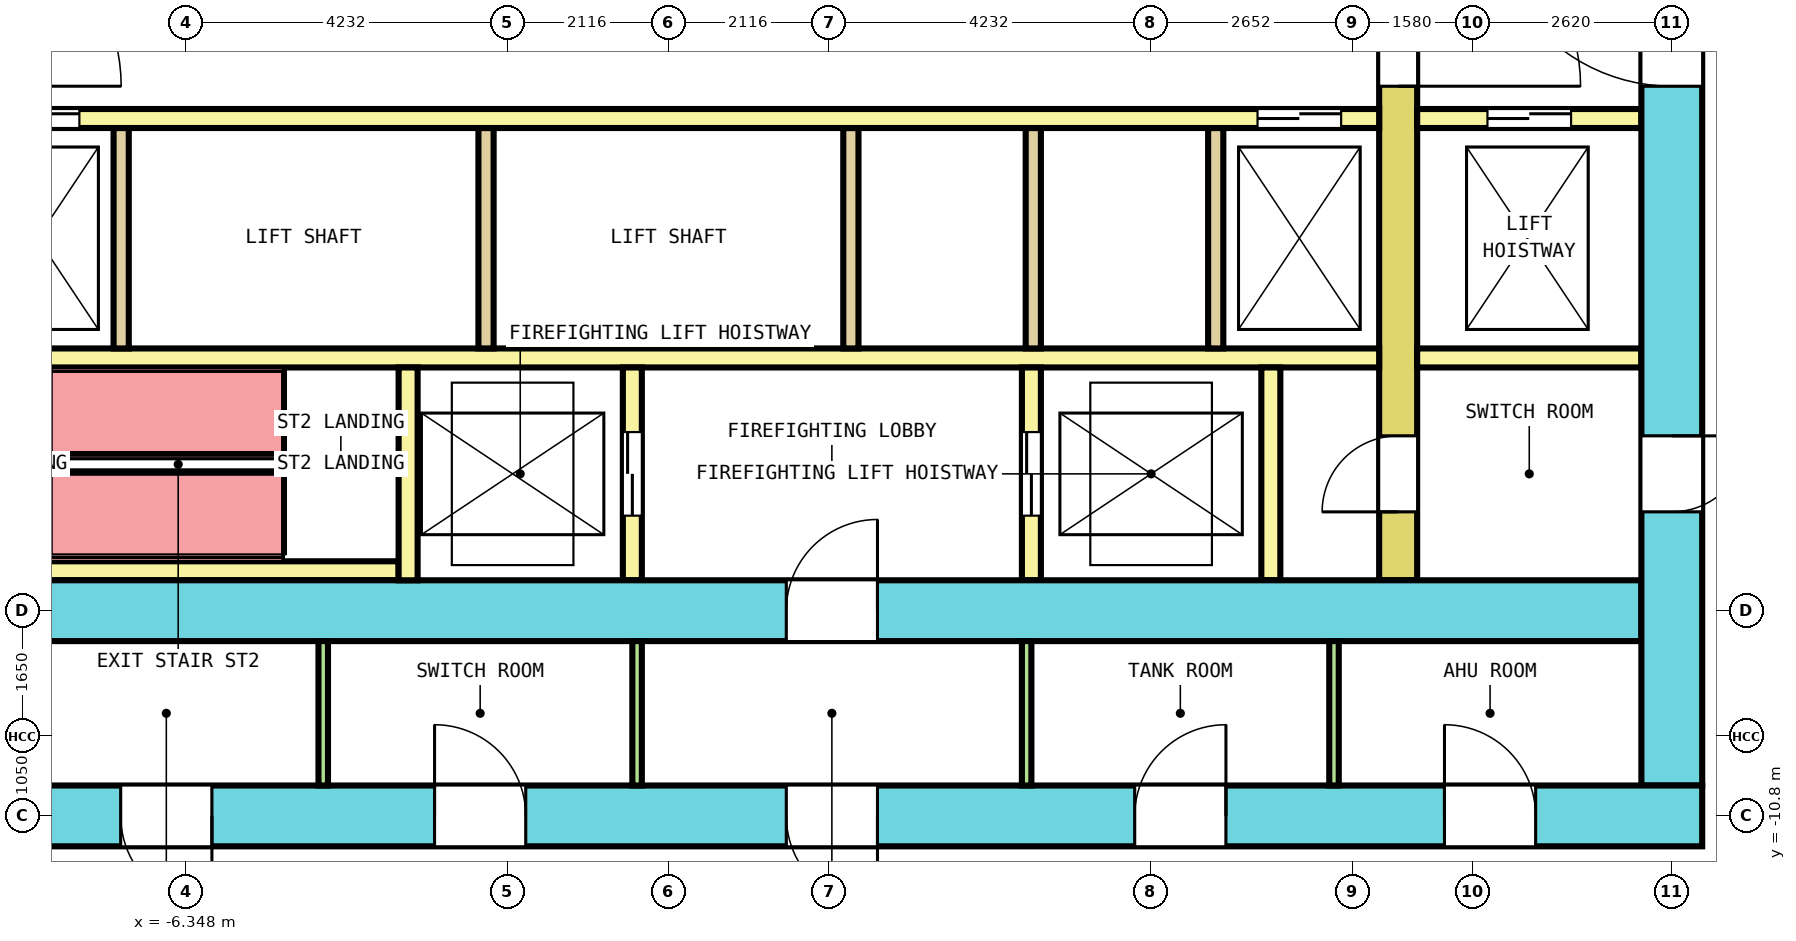
"""IFC4 building model, lengths in metres.
Left out: names, types, materials, properties, quantities, classifications, styles, units other than length and angle.
Written with IfcOpenShell. Run it as: python <this file> out.ifc"""

import sys

from ifc_helpers import new_model, si_unit, direction, frame, frame_2d, origin, place, context, subcontext, project, spatial, rectangle, extrude, element, fill, save


model = new_model("IFC4")
c1 = context("Model", 3, precision=1e-05, world=origin(), true_north=direction((0.0, 1.0)))
c2 = subcontext(c1, "Body", "Model", "MODEL_VIEW")
j1 = project(units=[si_unit("LENGTHUNIT", "METRE"), si_unit("PLANEANGLEUNIT", "RADIAN")], contexts=[c1])
p1 = place(None, origin())
s1 = spatial("IfcSite", under=j1, at=p1, CompositionType="ELEMENT")
p2 = place(p1, origin())
s2 = spatial("IfcBuilding", under=s1, at=p2, CompositionType="ELEMENT")
p3 = place(p2, frame((0.0, 0.0, 71.8)))
s3 = spatial("IfcBuildingStorey", under=s2, at=p3, CompositionType="ELEMENT", Elevation=71.8)
p4 = place(p3, frame((-13.6, -10.8, 0.0), z_axis=(0.0, 0.0, 1.0), x_axis=(1.0, 0.0, 0.0)))
e1 = element("IfcWall", 1, at=p4, inside=s3, PredefinedType="SHEAR", context=c2, shape_type="SweptSolid", body=[
    extrude(rectangle(XDim=27.2, YDim=0.8, at=frame_2d((13.6, 0.0))), origin(), (0.0, 0.0, 1.0), 8.7),
])
p5 = place(p4, frame((2.233, 0.0, 0.0)))
e2 = element("IfcOpeningElement", 2, at=p5, cuts=e1, PredefinedType="OPENING", context=c2, shape_type="SweptSolid", body=[
    extrude(rectangle(XDim=1.2, YDim=2.1, at=frame_2d((0.6, 1.05))), frame((0.0, 0.41, 0.0), z_axis=(0.0, -1.0, 0.0), x_axis=(1.0, 0.0, 0.0)), (0.0, 0.0, 1.0), 0.82),
])
p6 = place(p4, frame((6.394, 0.0, 0.0)))
e3 = element("IfcOpeningElement", 3, at=p6, cuts=e1, PredefinedType="OPENING", context=c2, shape_type="SweptSolid", body=[
    extrude(rectangle(XDim=1.2, YDim=2.1, at=frame_2d((0.6, 1.05))), frame((0.0, 0.41, 0.0), z_axis=(0.0, -1.0, 0.0), x_axis=(1.0, 0.0, 0.0)), (0.0, 0.0, 1.0), 0.82),
])
p7 = place(p4, frame((10.523, 0.0, 0.0)))
e4 = element("IfcOpeningElement", 4, at=p7, cuts=e1, PredefinedType="OPENING", context=c2, shape_type="SweptSolid", body=[
    extrude(rectangle(XDim=1.2, YDim=2.1, at=frame_2d((0.6, 1.05))), frame((0.0, 0.41, 0.0), z_axis=(0.0, -1.0, 0.0), x_axis=(1.0, 0.0, 0.0)), (0.0, 0.0, 1.0), 0.82),
])
p8 = place(p4, frame((19.734, 0.0, 0.0)))
e5 = element("IfcOpeningElement", 5, at=p8, cuts=e1, PredefinedType="OPENING", context=c2, shape_type="SweptSolid", body=[
    extrude(rectangle(XDim=1.2, YDim=2.1, at=frame_2d((0.6, 1.05))), frame((0.0, 0.41, 0.0), z_axis=(0.0, -1.0, 0.0), x_axis=(1.0, 0.0, 0.0)), (0.0, 0.0, 1.0), 0.82),
])
p9 = place(p4, frame((23.809, 0.0, 0.0)))
e6 = element("IfcOpeningElement", 6, at=p9, cuts=e1, PredefinedType="OPENING", context=c2, shape_type="SweptSolid", body=[
    extrude(rectangle(XDim=1.2, YDim=2.1, at=frame_2d((0.6, 1.05))), frame((0.0, 0.41, 0.0), z_axis=(0.0, -1.0, 0.0), x_axis=(1.0, 0.0, 0.0)), (0.0, 0.0, 1.0), 0.82),
])
p10 = place(p4, frame((15.15, 0.0, 0.0)))
e7 = element("IfcOpeningElement", 7, at=p10, cuts=e1, PredefinedType="OPENING", context=c2, shape_type="SweptSolid", body=[
    extrude(rectangle(XDim=1.2, YDim=2.1, at=frame_2d((0.6, 1.05))), frame((0.0, 0.41, 0.0), z_axis=(0.0, -1.0, 0.0), x_axis=(1.0, 0.0, 0.0)), (0.0, 0.0, 1.0), 0.82),
])
p11 = place(p3, frame((13.2, -10.4, 0.0), z_axis=(0.0, 0.0, 1.0), x_axis=(0.0, 1.0, 0.0)))
e8 = element("IfcWall", 8, at=p11, inside=s3, PredefinedType="SHEAR", context=c2, shape_type="SweptSolid", body=[
    extrude(rectangle(XDim=20.8, YDim=0.8, at=frame_2d((10.4, 0.0))), origin(), (0.0, 0.0, 1.0), 8.7),
])
p12 = place(p11, frame((9.2, 0.0, 0.0)))
e9 = element("IfcOpeningElement", 9, at=p12, cuts=e8, PredefinedType="OPENING", context=c2, shape_type="SweptSolid", body=[
    extrude(rectangle(XDim=2.4, YDim=2.1, at=frame_2d((1.2, 1.05))), frame((0.0, 0.41, 0.0), z_axis=(0.0, -1.0, 0.0), x_axis=(1.0, 0.0, 0.0)), (0.0, 0.0, 1.0), 0.82),
])
p13 = place(p11, frame((16.1, 0.0, 0.0)))
e10 = element("IfcOpeningElement", 10, at=p13, cuts=e8, PredefinedType="OPENING", context=c2, shape_type="SweptSolid", body=[
    extrude(rectangle(XDim=1.2, YDim=2.1, at=frame_2d((0.6, 1.05))), frame((0.0, 0.41, 0.0), z_axis=(0.0, -1.0, 0.0), x_axis=(1.0, 0.0, 0.0)), (0.0, 0.0, 1.0), 0.82),
])
p14 = place(p11, frame((3.6, 0.0, 0.0)))
e11 = element("IfcOpeningElement", 11, at=p14, cuts=e8, PredefinedType="OPENING", context=c2, shape_type="SweptSolid", body=[
    extrude(rectangle(XDim=1.0, YDim=2.1, at=frame_2d((0.5, 1.05))), frame((0.0, 0.41, 0.0), z_axis=(0.0, -1.0, 0.0), x_axis=(1.0, 0.0, 0.0)), (0.0, 0.0, 1.0), 0.82),
])
p15 = place(p3, frame((-12.8, -8.1, 0.0), z_axis=(0.0, 0.0, 1.0), x_axis=(1.0, 0.0, 0.0)))
e12 = element("IfcWall", 12, at=p15, inside=s3, PredefinedType="SHEAR", context=c2, shape_type="SweptSolid", body=[
    extrude(rectangle(XDim=25.6, YDim=0.8, at=frame_2d((12.8, 0.0))), origin(), (0.0, 0.0, 1.0), 8.7),
])
p16 = place(p15, frame((14.35, 0.0, 0.0)))
e13 = element("IfcOpeningElement", 13, at=p16, cuts=e12, PredefinedType="OPENING", context=c2, shape_type="SweptSolid", body=[
    extrude(rectangle(XDim=1.2, YDim=2.1, at=frame_2d((0.6, 1.05))), frame((0.0, 0.41, 0.0), z_axis=(0.0, -1.0, 0.0), x_axis=(1.0, 0.0, 0.0)), (0.0, 0.0, 1.0), 0.82),
])
p17 = place(p3, frame((9.6, -7.7, 0.0), z_axis=(0.0, 0.0, 1.0), x_axis=(0.0, 1.0, 0.0)))
e14 = element("IfcWall", 14, at=p17, inside=s3, PredefinedType="SHEAR", context=c2, shape_type="SweptSolid", body=[
    extrude(rectangle(XDim=15.4, YDim=0.5, at=frame_2d((7.7, 0.0))), origin(), (0.0, 0.0, 1.0), 8.7),
])
p18 = place(p17, frame((6.5, 0.0, 0.0)))
e15 = element("IfcOpeningElement", 15, at=p18, cuts=e14, PredefinedType="OPENING", context=c2, shape_type="SweptSolid", body=[
    extrude(rectangle(XDim=2.4, YDim=2.1, at=frame_2d((1.2, 1.05))), frame((0.0, 0.26, 0.0), z_axis=(0.0, -1.0, 0.0), x_axis=(1.0, 0.0, 0.0)), (0.0, 0.0, 1.0), 0.52),
])
p19 = place(p17, frame((13.4, 0.0, 0.0)))
e16 = element("IfcOpeningElement", 16, at=p19, cuts=e14, PredefinedType="OPENING", context=c2, shape_type="SweptSolid", body=[
    extrude(rectangle(XDim=1.2, YDim=2.1, at=frame_2d((0.6, 1.05))), frame((0.0, 0.26, 0.0), z_axis=(0.0, -1.0, 0.0), x_axis=(1.0, 0.0, 0.0)), (0.0, 0.0, 1.0), 0.52),
])
p20 = place(p17, frame((0.9, 0.0, 0.0)))
e17 = element("IfcOpeningElement", 17, at=p20, cuts=e14, PredefinedType="OPENING", context=c2, shape_type="SweptSolid", body=[
    extrude(rectangle(XDim=1.0, YDim=2.1, at=frame_2d((0.5, 1.05))), frame((0.0, 0.26, 0.0), z_axis=(0.0, -1.0, 0.0), x_axis=(1.0, 0.0, 0.0)), (0.0, 0.0, 1.0), 0.52),
])
p21 = place(p3, frame((-9.35, -1.625, 0.0), z_axis=(0.0, 0.0, 1.0), x_axis=(1.0, 0.0, 0.0)))
e18 = element("IfcWall", 18, at=p21, inside=s3, PredefinedType="SOLIDWALL", context=c2, shape_type="SweptSolid", body=[
    extrude(rectangle(XDim=18.7, YDim=0.25, at=frame_2d((9.35, 0.0))), origin(), (0.0, 0.0, 1.0), 8.7),
])
p22 = place(p21, frame((0.5, 0.0, 0.0)))
e19 = element("IfcOpeningElement", 19, at=p22, cuts=e18, PredefinedType="OPENING", context=c2, shape_type="SweptSolid", body=[
    extrude(rectangle(XDim=1.1, YDim=2.1, at=frame_2d((0.55, 1.05))), frame((0.0, 0.135, 0.0), z_axis=(0.0, -1.0, 0.0), x_axis=(1.0, 0.0, 0.0)), (0.0, 0.0, 1.0), 0.27),
])
p23 = place(p21, frame((17.1, 0.0, 0.0)))
e20 = element("IfcOpeningElement", 20, at=p23, cuts=e18, PredefinedType="OPENING", context=c2, shape_type="SweptSolid", body=[
    extrude(rectangle(XDim=1.1, YDim=2.1, at=frame_2d((0.55, 1.05))), frame((0.0, 0.135, 0.0), z_axis=(0.0, -1.0, 0.0), x_axis=(1.0, 0.0, 0.0)), (0.0, 0.0, 1.0), 0.27),
])
p24 = place(p3, frame((9.85, -1.625, 0.0), z_axis=(0.0, 0.0, 1.0), x_axis=(1.0, 0.0, 0.0)))
e21 = element("IfcWall", 21, at=p24, inside=s3, PredefinedType="SOLIDWALL", context=c2, shape_type="SweptSolid", body=[
    extrude(rectangle(XDim=2.95, YDim=0.25, at=frame_2d((1.475, 0.0))), origin(), (0.0, 0.0, 1.0), 8.7),
])
p25 = place(p24, frame((0.925, 0.0, 0.0)))
e22 = element("IfcOpeningElement", 22, at=p25, cuts=e21, PredefinedType="OPENING", context=c2, shape_type="SweptSolid", body=[
    extrude(rectangle(XDim=1.1, YDim=2.1, at=frame_2d((0.55, 1.05))), frame((0.0, 0.135, 0.0), z_axis=(0.0, -1.0, 0.0), x_axis=(1.0, 0.0, 0.0)), (0.0, 0.0, 1.0), 0.27),
])
p26 = place(p3, frame((-9.35, -4.775, 0.0), z_axis=(0.0, 0.0, 1.0), x_axis=(1.0, 0.0, 0.0)))
e23 = element("IfcWall", 23, at=p26, inside=s3, PredefinedType="SOLIDWALL", context=c2, shape_type="SweptSolid", body=[
    extrude(rectangle(XDim=18.7, YDim=0.25, at=frame_2d((9.35, 0.0))), origin(), (0.0, 0.0, 1.0), 8.7),
])
p27 = place(p3, frame((9.85, -4.775, 0.0), z_axis=(0.0, 0.0, 1.0), x_axis=(1.0, 0.0, 0.0)))
e24 = element("IfcWall", 24, at=p27, inside=s3, PredefinedType="SOLIDWALL", context=c2, shape_type="SweptSolid", body=[
    extrude(rectangle(XDim=2.95, YDim=0.25, at=frame_2d((1.475, 0.0))), origin(), (0.0, 0.0, 1.0), 8.7),
])
for number, where, z_axis, x_axis in (
    (25, (-7.2, -4.65, 0.0), (0.0, 0.0, 1.0), (0.0, 1.0, 0.0)),
    (26, (-2.4, -4.65, 0.0), (0.0, 0.0, 1.0), (0.0, 1.0, 0.0)),
    (27, (2.4, -4.65, 0.0), (0.0, 0.0, 1.0), (0.0, 1.0, 0.0)),
    (28, (4.8, -4.65, 0.0), (0.0, 0.0, 1.0), (0.0, 1.0, 0.0)),
    (29, (7.2, -4.65, 0.0), (0.0, 0.0, 1.0), (0.0, 1.0, 0.0)),
):
    element("IfcWall", number, at=place(p3, frame(where, z_axis=z_axis, x_axis=x_axis)), inside=s3, PredefinedType="SOLIDWALL", context=c2, shape_type="SweptSolid", body=[
        extrude(rectangle(XDim=2.9, YDim=0.2, at=frame_2d((1.45, 0.0))), origin(), (0.0, 0.0, 1.0), 8.7),
    ])
p28 = place(p3, frame((-9.35, -7.575, 0.0), z_axis=(0.0, 0.0, 1.0), x_axis=(1.0, 0.0, 0.0)))
e30 = element("IfcWall", 30, at=p28, inside=s3, PredefinedType="SOLIDWALL", context=c2, shape_type="SweptSolid", body=[
    extrude(rectangle(XDim=5.8, YDim=0.25, at=frame_2d((2.9, 0.0))), origin(), (0.0, 0.0, 1.0), 8.7),
])
p29 = place(p3, frame((-3.425, -7.7, 0.0), z_axis=(0.0, 0.0, 1.0), x_axis=(0.0, 1.0, 0.0)))
e31 = element("IfcWall", 31, at=p29, inside=s3, PredefinedType="SOLIDWALL", context=c2, shape_type="SweptSolid", body=[
    extrude(rectangle(XDim=2.8, YDim=0.25, at=frame_2d((1.4, 0.0))), origin(), (0.0, 0.0, 1.0), 8.7),
])
p30 = place(p3, frame((-0.475, -7.7, 0.0), z_axis=(0.0, 0.0, 1.0), x_axis=(0.0, 1.0, 0.0)))
e32 = element("IfcWall", 32, at=p30, inside=s3, PredefinedType="SOLIDWALL", context=c2, shape_type="SweptSolid", body=[
    extrude(rectangle(XDim=2.8, YDim=0.25, at=frame_2d((1.4, 0.0))), origin(), (0.0, 0.0, 1.0), 8.7),
])
p31 = place(p30, frame((0.85, 0.0, 0.0)))
e33 = element("IfcOpeningElement", 33, at=p31, cuts=e32, PredefinedType="OPENING", context=c2, shape_type="SweptSolid", body=[
    extrude(rectangle(XDim=1.1, YDim=2.1, at=frame_2d((0.55, 1.05))), frame((0.0, 0.135, 0.0), z_axis=(0.0, -1.0, 0.0), x_axis=(1.0, 0.0, 0.0)), (0.0, 0.0, 1.0), 0.27),
])
p32 = place(p3, frame((4.775, -7.7, 0.0), z_axis=(0.0, 0.0, 1.0), x_axis=(0.0, 1.0, 0.0)))
e34 = element("IfcWall", 34, at=p32, inside=s3, PredefinedType="SOLIDWALL", context=c2, shape_type="SweptSolid", body=[
    extrude(rectangle(XDim=2.8, YDim=0.25, at=frame_2d((1.4, 0.0))), origin(), (0.0, 0.0, 1.0), 8.7),
])
p33 = place(p32, frame((0.85, 0.0, 0.0)))
e35 = element("IfcOpeningElement", 35, at=p33, cuts=e34, PredefinedType="OPENING", context=c2, shape_type="SweptSolid", body=[
    extrude(rectangle(XDim=1.1, YDim=2.1, at=frame_2d((0.55, 1.05))), frame((0.0, 0.135, 0.0), z_axis=(0.0, -1.0, 0.0), x_axis=(1.0, 0.0, 0.0)), (0.0, 0.0, 1.0), 0.27),
])
p34 = place(p3, frame((7.925, -7.7, 0.0), z_axis=(0.0, 0.0, 1.0), x_axis=(0.0, 1.0, 0.0)))
e36 = element("IfcWall", 36, at=p34, inside=s3, PredefinedType="SOLIDWALL", context=c2, shape_type="SweptSolid", body=[
    extrude(rectangle(XDim=2.8, YDim=0.25, at=frame_2d((1.4, 0.0))), origin(), (0.0, 0.0, 1.0), 8.7),
])
for number, where, z_axis, x_axis in (
    (37, (-4.542, -10.4, 0.0), (0.0, 0.0, 1.0), (0.0, 1.0, 0.0)),
    (38, (-0.413, -10.4, 0.0), (0.0, 0.0, 1.0), (0.0, 1.0, 0.0)),
    (39, (4.712, -10.4, 0.0), (0.0, 0.0, 1.0), (0.0, 1.0, 0.0)),
    (40, (8.756, -10.4, 0.0), (0.0, 0.0, 1.0), (0.0, 1.0, 0.0)),
):
    element("IfcWall", number, at=place(p3, frame(where, z_axis=z_axis, x_axis=x_axis)), inside=s3, PredefinedType="PARTITIONING", context=c2, shape_type="SweptSolid", body=[
        extrude(rectangle(XDim=1.9, YDim=0.125, at=frame_2d((0.95, 0.0))), origin(), (0.0, 0.0, 1.0), 8.7),
    ])
p35 = place(p22, origin())
e41 = element("IfcDoor", 41, at=p35, inside=s3, OperationType="DOUBLE_DOOR_SLIDING", PredefinedType="DOOR", context=c2, shape_type="SweptSolid", body=[
    extrude(rectangle(XDim=1.1, YDim=2.1, at=frame_2d((0.55, 1.05))), frame((0.0, 0.075, 0.0), z_axis=(0.0, -1.0, 0.0), x_axis=(1.0, 0.0, 0.0)), (0.0, 0.0, 1.0), 0.15),
])
fill(e19, e41)
p36 = place(p23, origin())
e42 = element("IfcDoor", 42, at=p36, inside=s3, OperationType="DOUBLE_DOOR_SLIDING", PredefinedType="DOOR", context=c2, shape_type="SweptSolid", body=[
    extrude(rectangle(XDim=1.1, YDim=2.1, at=frame_2d((0.55, 1.05))), frame((0.0, 0.075, 0.0), z_axis=(0.0, -1.0, 0.0), x_axis=(1.0, 0.0, 0.0)), (0.0, 0.0, 1.0), 0.15),
])
fill(e20, e42)
p37 = place(p25, origin())
e43 = element("IfcDoor", 43, at=p37, inside=s3, OperationType="DOUBLE_DOOR_SLIDING", PredefinedType="DOOR", context=c2, shape_type="SweptSolid", body=[
    extrude(rectangle(XDim=1.1, YDim=2.1, at=frame_2d((0.55, 1.05))), frame((0.0, 0.075, 0.0), z_axis=(0.0, -1.0, 0.0), x_axis=(1.0, 0.0, 0.0)), (0.0, 0.0, 1.0), 0.15),
])
fill(e22, e43)
p38 = place(p31, origin())
e44 = element("IfcDoor", 44, at=p38, inside=s3, OperationType="DOUBLE_DOOR_SLIDING", PredefinedType="DOOR", context=c2, shape_type="SweptSolid", body=[
    extrude(rectangle(XDim=1.1, YDim=2.1, at=frame_2d((0.55, 1.05))), frame((0.0, 0.075, 0.0), z_axis=(0.0, -1.0, 0.0), x_axis=(1.0, 0.0, 0.0)), (0.0, 0.0, 1.0), 0.15),
])
fill(e33, e44)
p39 = place(p33, origin())
e45 = element("IfcDoor", 45, at=p39, inside=s3, OperationType="DOUBLE_DOOR_SLIDING", PredefinedType="DOOR", context=c2, shape_type="SweptSolid", body=[
    extrude(rectangle(XDim=1.1, YDim=2.1, at=frame_2d((0.55, 1.05))), frame((0.0, 0.075, 0.0), z_axis=(0.0, -1.0, 0.0), x_axis=(1.0, 0.0, 0.0)), (0.0, 0.0, 1.0), 0.15),
])
fill(e35, e45)
p40 = place(p18, origin())
e46 = element("IfcDoor", 46, at=p40, inside=s3, OperationType="DOUBLE_DOOR_SINGLE_SWING", PredefinedType="DOOR", context=c2, shape_type="SweptSolid", body=[
    extrude(rectangle(XDim=2.4, YDim=2.1, at=frame_2d((1.2, 1.05))), frame((0.0, 0.2, 0.0), z_axis=(0.0, -1.0, 0.0), x_axis=(1.0, 0.0, 0.0)), (0.0, 0.0, 1.0), 0.4),
])
fill(e15, e46)
p41 = place(p12, origin())
e47 = element("IfcDoor", 47, at=p41, inside=s3, OperationType="DOUBLE_DOOR_SINGLE_SWING", PredefinedType="DOOR", context=c2, shape_type="SweptSolid", body=[
    extrude(rectangle(XDim=2.4, YDim=2.1, at=frame_2d((1.2, 1.05))), frame((0.0, 0.3, 0.0), z_axis=(0.0, -1.0, 0.0), x_axis=(1.0, 0.0, 0.0)), (0.0, 0.0, 1.0), 0.6),
])
fill(e9, e47)
p42 = place(p16, origin())
e48 = element("IfcDoor", 48, at=p42, inside=s3, OperationType="SINGLE_SWING_RIGHT", PredefinedType="DOOR", context=c2, shape_type="SweptSolid", body=[
    extrude(rectangle(XDim=1.2, YDim=2.1, at=frame_2d((0.6, 1.05))), frame((0.0, 0.3, 0.0), z_axis=(0.0, -1.0, 0.0), x_axis=(1.0, 0.0, 0.0)), (0.0, 0.0, 1.0), 0.6),
])
fill(e13, e48)
p43 = place(p20, origin())
e49 = element("IfcDoor", 49, at=p43, inside=s3, OperationType="SINGLE_SWING_RIGHT", PredefinedType="DOOR", context=c2, shape_type="SweptSolid", body=[
    extrude(rectangle(XDim=1.0, YDim=2.1, at=frame_2d((0.5, 1.05))), frame((0.0, 0.2, 0.0), z_axis=(0.0, -1.0, 0.0), x_axis=(1.0, 0.0, 0.0)), (0.0, 0.0, 1.0), 0.4),
])
fill(e17, e49)
p44 = place(p14, origin())
e50 = element("IfcDoor", 50, at=p44, inside=s3, OperationType="SINGLE_SWING_LEFT", PredefinedType="DOOR", context=c2, shape_type="SweptSolid", body=[
    extrude(rectangle(XDim=1.0, YDim=2.1, at=frame_2d((0.5, 1.05))), frame((0.0, 0.3, 0.0), z_axis=(0.0, -1.0, 0.0), x_axis=(1.0, 0.0, 0.0)), (0.0, 0.0, 1.0), 0.6),
])
fill(e11, e50)
p45 = place(p6, origin())
e51 = element("IfcDoor", 51, at=p45, inside=s3, OperationType="SINGLE_SWING_RIGHT", PredefinedType="DOOR", context=c2, shape_type="SweptSolid", body=[
    extrude(rectangle(XDim=1.2, YDim=2.1, at=frame_2d((0.6, 1.05))), frame((0.0, 0.3, 0.0), z_axis=(0.0, -1.0, 0.0), x_axis=(1.0, 0.0, 0.0)), (0.0, 0.0, 1.0), 0.6),
])
fill(e3, e51)
p46 = place(p7, origin())
e52 = element("IfcDoor", 52, at=p46, inside=s3, OperationType="SINGLE_SWING_LEFT", PredefinedType="DOOR", context=c2, shape_type="SweptSolid", body=[
    extrude(rectangle(XDim=1.2, YDim=2.1, at=frame_2d((0.6, 1.05))), frame((0.0, 0.3, 0.0), z_axis=(0.0, -1.0, 0.0), x_axis=(1.0, 0.0, 0.0)), (0.0, 0.0, 1.0), 0.6),
])
fill(e4, e52)
p47 = place(p8, origin())
e53 = element("IfcDoor", 53, at=p47, inside=s3, OperationType="SINGLE_SWING_RIGHT", PredefinedType="DOOR", context=c2, shape_type="SweptSolid", body=[
    extrude(rectangle(XDim=1.2, YDim=2.1, at=frame_2d((0.6, 1.05))), frame((0.0, 0.3, 0.0), z_axis=(0.0, -1.0, 0.0), x_axis=(1.0, 0.0, 0.0)), (0.0, 0.0, 1.0), 0.6),
])
fill(e5, e53)
p48 = place(p9, origin())
e54 = element("IfcDoor", 54, at=p48, inside=s3, OperationType="SINGLE_SWING_LEFT", PredefinedType="DOOR", context=c2, shape_type="SweptSolid", body=[
    extrude(rectangle(XDim=1.2, YDim=2.1, at=frame_2d((0.6, 1.05))), frame((0.0, 0.3, 0.0), z_axis=(0.0, -1.0, 0.0), x_axis=(1.0, 0.0, 0.0)), (0.0, 0.0, 1.0), 0.6),
])
fill(e6, e54)
p49 = place(p10, origin())
e55 = element("IfcDoor", 55, at=p49, inside=s3, OperationType="SINGLE_SWING_RIGHT", PredefinedType="DOOR", context=c2, shape_type="SweptSolid", body=[
    extrude(rectangle(XDim=1.2, YDim=2.1, at=frame_2d((0.6, 1.05))), frame((0.0, 0.3, 0.0), z_axis=(0.0, -1.0, 0.0), x_axis=(1.0, 0.0, 0.0)), (0.0, 0.0, 1.0), 0.6),
])
fill(e7, e55)
save(model, sys.argv[1])
